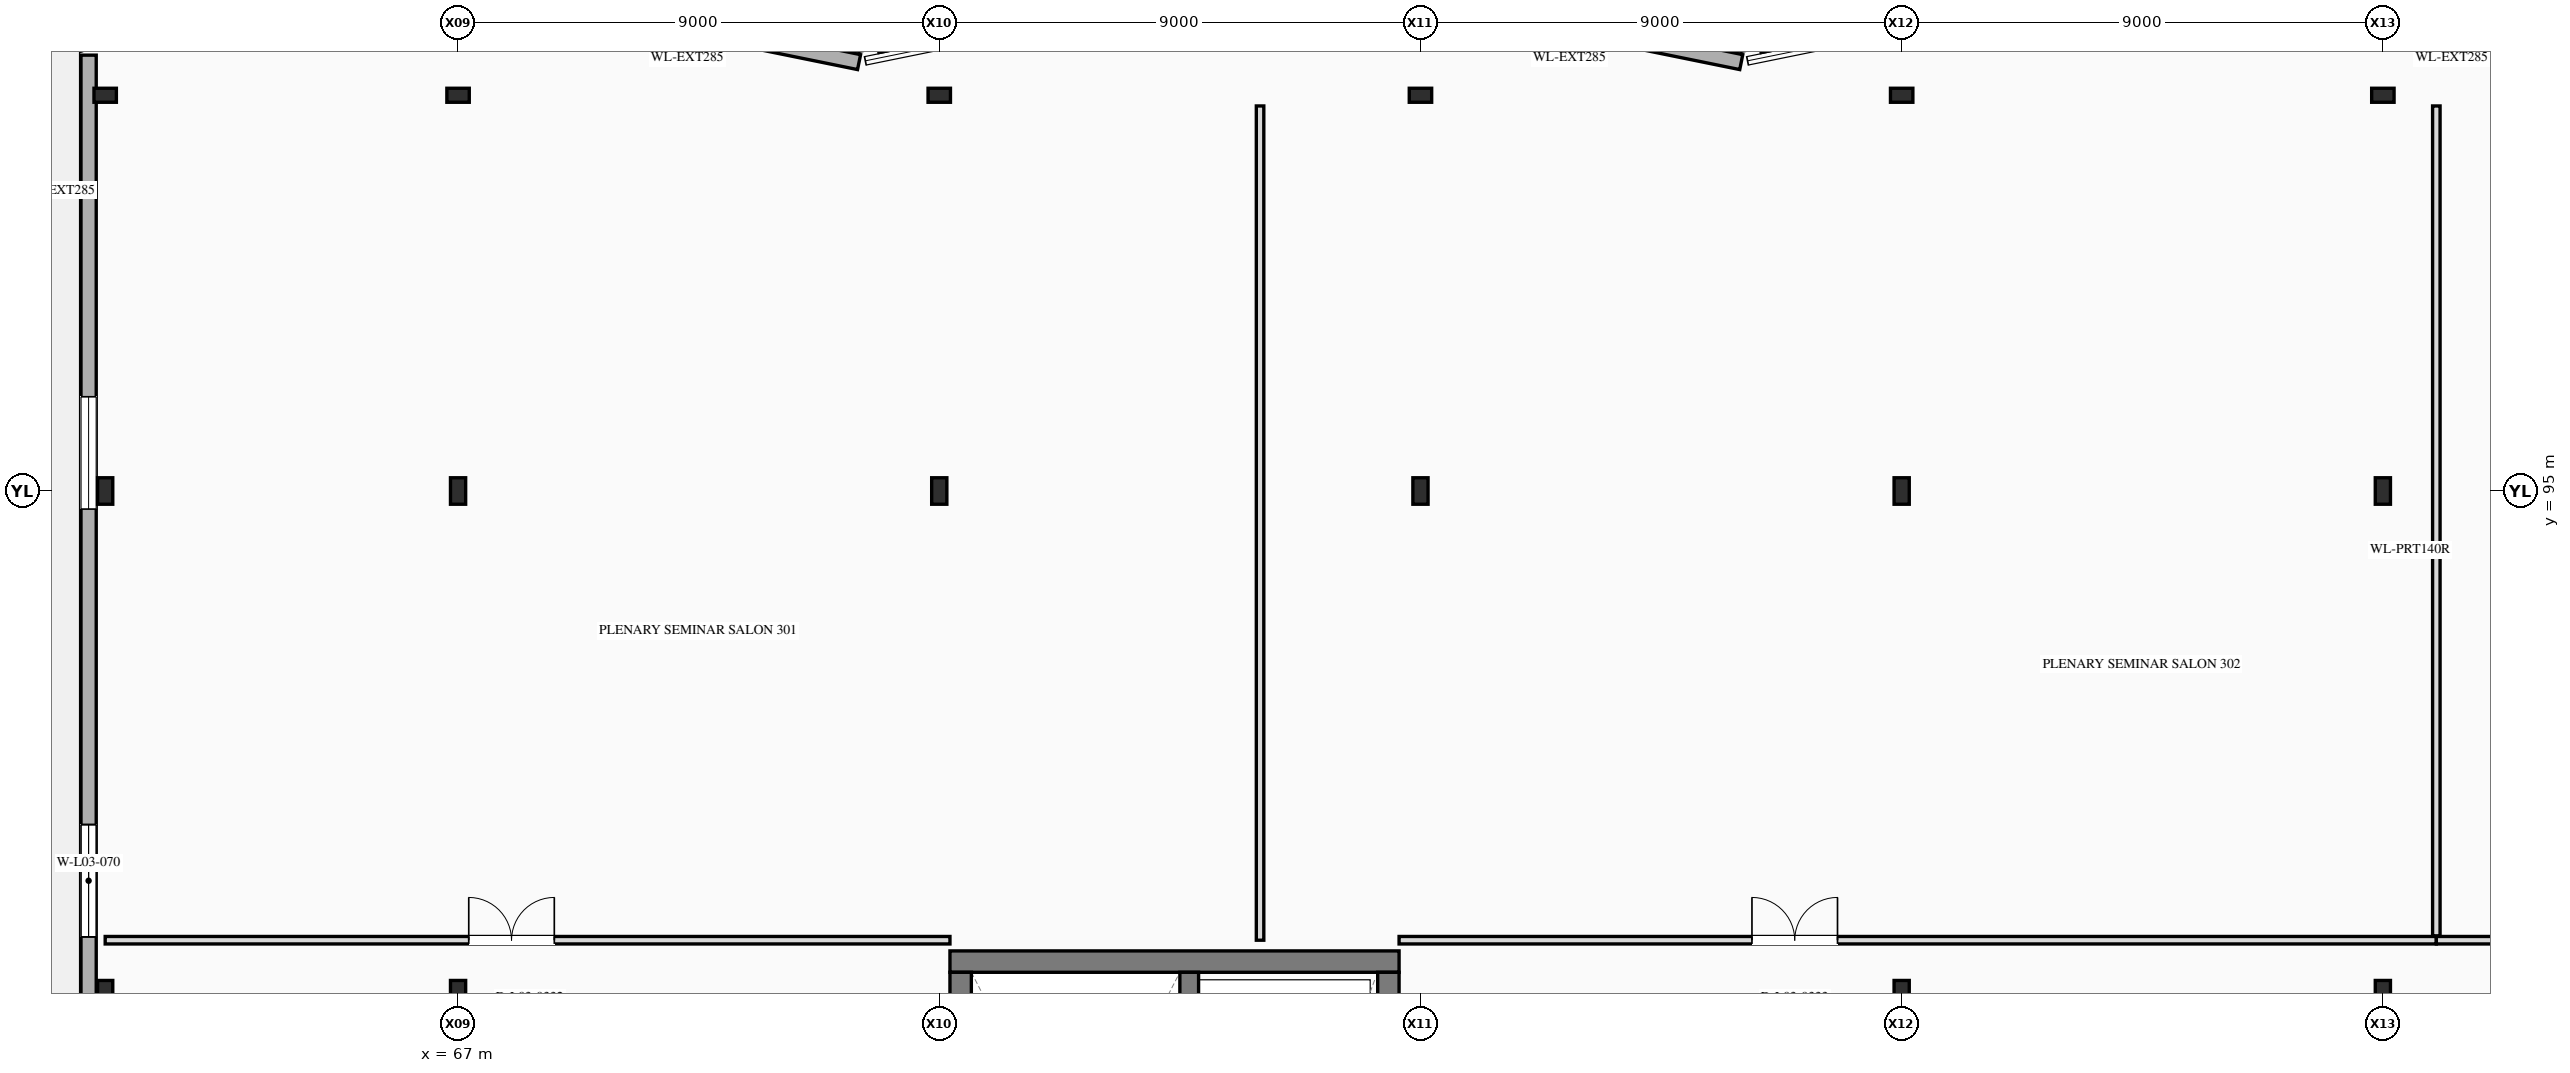
"""IFC4 building model, lengths in metres.
Left out: names, types, materials, properties, quantities, classifications, styles, units other than length and angle.
Written with IfcOpenShell. Run it as: python <this file> out.ifc"""

import sys

from ifc_helpers import new_model, si_unit, direction, frame, frame_2d, origin, origin_2d, place, context, subcontext, project, spatial, rectangle, i_section, extrude, element, fill, save


model = new_model("IFC4")
c1 = context("Model", 3, precision=1e-05, world=origin(), true_north=direction((0.0, 1.0)))
c2 = subcontext(c1, "Body", "Model", "MODEL_VIEW")
j1 = project(units=[si_unit("LENGTHUNIT", "METRE"), si_unit("PLANEANGLEUNIT", "RADIAN")], contexts=[c1])
p1 = place(None, origin())
s1 = spatial("IfcSite", under=j1, at=p1, CompositionType="ELEMENT")
p2 = place(p1, origin())
s2 = spatial("IfcBuilding", under=s1, at=p2, CompositionType="ELEMENT")
p3 = place(p2, frame((0.0, 0.0, 15.6)))
s3 = spatial("IfcBuildingStorey", under=s2, at=p3, CompositionType="ELEMENT", Elevation=15.6)
for number, where, z_axis, x_axis in (
    (1, (67.0, 85.6, 0.0), (0.0, 0.0, 1.0), (1.0, 0.0, 0.0)),
    (2, (67.0, 95.0, 0.0), (0.0, 0.0, 1.0), (1.0, 0.0, 0.0)),
    (3, (76.0, 95.0, 0.0), (0.0, 0.0, 1.0), (1.0, 0.0, 0.0)),
    (4, (85.0, 95.0, 0.0), (0.0, 0.0, 1.0), (1.0, 0.0, 0.0)),
    (5, (94.0, 85.6, 0.0), (0.0, 0.0, 1.0), (1.0, 0.0, 0.0)),
    (6, (94.0, 95.0, 0.0), (0.0, 0.0, 1.0), (1.0, 0.0, 0.0)),
    (7, (103.0, 85.6, 0.0), (0.0, 0.0, 1.0), (1.0, 0.0, 0.0)),
    (8, (103.0, 95.0, 0.0), (0.0, 0.0, 1.0), (1.0, 0.0, 0.0)),
    (9, (60.4, 85.6, 0.0), (0.0, 0.0, 1.0), (1.0, 0.0, 0.0)),
    (10, (60.4, 95.0, 0.0), (0.0, 0.0, 1.0), (1.0, 0.0, 0.0)),
):
    element("IfcColumn", number, at=place(p3, frame(where, z_axis=z_axis, x_axis=x_axis)), inside=s3, PredefinedType="COLUMN", context=c2, shape_type="SweptSolid", body=[
        extrude(i_section(OverallWidth=0.284, OverallDepth=0.495, WebThickness=0.019, FlangeThickness=0.033, at=origin_2d()), origin(), (0.0, 0.0, 1.0), 3.9),
    ])
for number, where, z_axis, x_axis in (
    (11, (60.4, 102.4, 0.0), (0.0, 0.0, 1.0), (0.0, 1.0, 0.0)),
    (12, (67.0, 102.4, 0.0), (0.0, 0.0, 1.0), (0.0, 1.0, 0.0)),
    (13, (76.0, 102.4, 0.0), (0.0, 0.0, 1.0), (0.0, 1.0, 0.0)),
    (14, (85.0, 102.4, 0.0), (0.0, 0.0, 1.0), (0.0, 1.0, 0.0)),
    (15, (94.0, 102.4, 0.0), (0.0, 0.0, 1.0), (0.0, 1.0, 0.0)),
    (16, (103.0, 102.4, 0.0), (0.0, 0.0, 1.0), (0.0, 1.0, 0.0)),
):
    element("IfcColumn", number, at=place(p3, frame(where, z_axis=z_axis, x_axis=x_axis)), inside=s3, PredefinedType="COLUMN", context=c2, shape_type="SweptSolid", body=[
        extrude(i_section(OverallWidth=0.262, OverallDepth=0.419, WebThickness=0.012, FlangeThickness=0.019, at=origin_2d()), origin(), (0.0, 0.0, 1.0), 3.9),
    ])
p4 = place(p3, frame((66.25, 104.698, 0.0), z_axis=(0.0, 0.0, 1.0), x_axis=(0.979925045119, -0.199366260807, 0.0)))
e17 = element("IfcWall", 17, at=p4, inside=s3, PredefinedType="STANDARD", context=c2, shape_type="SweptSolid", body=[
    extrude(rectangle(XDim=8.419, YDim=0.285, at=frame_2d((4.209, 0.0))), origin(), (0.0, 0.0, 1.0), 3.9),
])
p5 = place(p4, frame((0.35, 0.0, 0.9)))
e18 = element("IfcOpeningElement", 18, at=p5, cuts=e17, PredefinedType="OPENING", context=c2, shape_type="SweptSolid", body=[
    extrude(rectangle(XDim=1.5, YDim=1.7, at=frame_2d((0.75, 0.85))), frame((0.0, 0.152, 0.0), z_axis=(0.0, -1.0, 0.0), x_axis=(1.0, 0.0, 0.0)), (0.0, 0.0, 1.0), 0.305),
])
p6 = place(p3, frame((82.75, 104.698, 0.0), z_axis=(0.0, 0.0, 1.0), x_axis=(0.979925045119, -0.199366260807, 0.0)))
e19 = element("IfcWall", 19, at=p6, inside=s3, PredefinedType="STANDARD", context=c2, shape_type="SweptSolid", body=[
    extrude(rectangle(XDim=8.419, YDim=0.285, at=frame_2d((4.209, 0.0))), origin(), (0.0, 0.0, 1.0), 3.9),
])
p7 = place(p6, frame((0.35, 0.0, 0.9)))
e20 = element("IfcOpeningElement", 20, at=p7, cuts=e19, PredefinedType="OPENING", context=c2, shape_type="SweptSolid", body=[
    extrude(rectangle(XDim=1.5, YDim=1.7, at=frame_2d((0.75, 0.85))), frame((0.0, 0.152, 0.0), z_axis=(0.0, -1.0, 0.0), x_axis=(1.0, 0.0, 0.0)), (0.0, 0.0, 1.0), 0.305),
])
p8 = place(p3, frame((99.25, 104.698, 0.0), z_axis=(0.0, 0.0, 1.0), x_axis=(0.979925045119, -0.199366260807, 0.0)))
e21 = element("IfcWall", 21, at=p8, inside=s3, PredefinedType="STANDARD", context=c2, shape_type="SweptSolid", body=[
    extrude(rectangle(XDim=8.419, YDim=0.285, at=frame_2d((4.209, 0.0))), origin(), (0.0, 0.0, 1.0), 3.9),
])
p9 = place(p8, frame((0.35, 0.0, 0.9)))
e22 = element("IfcOpeningElement", 22, at=p9, cuts=e21, PredefinedType="OPENING", context=c2, shape_type="SweptSolid", body=[
    extrude(rectangle(XDim=1.5, YDim=1.7, at=frame_2d((0.75, 0.85))), frame((0.0, 0.152, 0.0), z_axis=(0.0, -1.0, 0.0), x_axis=(1.0, 0.0, 0.0)), (0.0, 0.0, 1.0), 0.305),
])
p10 = place(p3, frame((60.09, 66.662, 0.0), z_axis=(0.0, 0.0, 1.0), x_axis=(0.0, 1.0, 0.0)))
e23 = element("IfcWall", 23, at=p10, inside=s3, PredefinedType="STANDARD", context=c2, shape_type="SweptSolid", body=[
    extrude(rectangle(XDim=36.488, YDim=0.285, at=frame_2d((18.244, 0.0))), origin(), (0.0, 0.0, 1.0), 3.9),
])
p11 = place(p10, frame((4.0, 0.0, 0.9)))
e24 = element("IfcOpeningElement", 24, at=p11, cuts=e23, PredefinedType="OPENING", context=c2, shape_type="SweptSolid", body=[
    extrude(rectangle(XDim=2.1, YDim=1.9, at=frame_2d((1.05, 0.95))), frame((0.0, 0.152, 0.0), z_axis=(0.0, -1.0, 0.0), x_axis=(1.0, 0.0, 0.0)), (0.0, 0.0, 1.0), 0.305),
])
p12 = place(p10, frame((12.0, 0.0, 0.9)))
e25 = element("IfcOpeningElement", 25, at=p12, cuts=e23, PredefinedType="OPENING", context=c2, shape_type="SweptSolid", body=[
    extrude(rectangle(XDim=2.1, YDim=1.9, at=frame_2d((1.05, 0.95))), frame((0.0, 0.152, 0.0), z_axis=(0.0, -1.0, 0.0), x_axis=(1.0, 0.0, 0.0)), (0.0, 0.0, 1.0), 0.305),
])
p13 = place(p10, frame((20.0, 0.0, 0.9)))
e26 = element("IfcOpeningElement", 26, at=p13, cuts=e23, PredefinedType="OPENING", context=c2, shape_type="SweptSolid", body=[
    extrude(rectangle(XDim=2.1, YDim=1.9, at=frame_2d((1.05, 0.95))), frame((0.0, 0.152, 0.0), z_axis=(0.0, -1.0, 0.0), x_axis=(1.0, 0.0, 0.0)), (0.0, 0.0, 1.0), 0.305),
])
p14 = place(p10, frame((28.0, 0.0, 0.9)))
e27 = element("IfcOpeningElement", 27, at=p14, cuts=e23, PredefinedType="OPENING", context=c2, shape_type="SweptSolid", body=[
    extrude(rectangle(XDim=2.1, YDim=1.9, at=frame_2d((1.05, 0.95))), frame((0.0, 0.152, 0.0), z_axis=(0.0, -1.0, 0.0), x_axis=(1.0, 0.0, 0.0)), (0.0, 0.0, 1.0), 0.305),
])
p15 = place(p3, frame((84.6, 86.2, 0.0), z_axis=(0.0, 0.0, 1.0), x_axis=(-1.0, 0.0, 0.0)))
e28 = element("IfcWall", 28, at=p15, inside=s3, PredefinedType="SHEAR", context=c2, shape_type="SweptSolid", body=[
    extrude(rectangle(XDim=8.4, YDim=0.4, at=frame_2d((4.2, 0.0))), origin(), (0.0, 0.0, 1.0), 3.9),
])
p16 = place(p3, frame((76.4, 86.0, 0.0), z_axis=(0.0, 0.0, 1.0), x_axis=(0.0, -1.0, 0.0)))
e29 = element("IfcWall", 29, at=p16, inside=s3, PredefinedType="SHEAR", context=c2, shape_type="SweptSolid", body=[
    extrude(rectangle(XDim=9.4, YDim=0.4, at=frame_2d((4.7, 0.0))), origin(), (0.0, 0.0, 1.0), 3.9),
])
p17 = place(p3, frame((84.4, 76.6, 0.0), z_axis=(0.0, 0.0, 1.0), x_axis=(0.0, 1.0, 0.0)))
e30 = element("IfcWall", 30, at=p17, inside=s3, PredefinedType="SHEAR", context=c2, shape_type="SweptSolid", body=[
    extrude(rectangle(XDim=9.4, YDim=0.4, at=frame_2d((4.7, 0.0))), origin(), (0.0, 0.0, 1.0), 3.9),
])
p18 = place(p17, frame((2.05, 0.0, 0.0)))
e31 = element("IfcOpeningElement", 31, at=p18, cuts=e30, PredefinedType="OPENING", context=c2, shape_type="SweptSolid", body=[
    extrude(rectangle(XDim=1.1, YDim=2.2, at=frame_2d((0.55, 1.1))), frame((0.0, 0.21, 0.0), z_axis=(0.0, -1.0, 0.0), x_axis=(1.0, 0.0, 0.0)), (0.0, 0.0, 1.0), 0.42),
])
p19 = place(p17, frame((5.65, 0.0, 0.0)))
e32 = element("IfcOpeningElement", 32, at=p19, cuts=e30, PredefinedType="OPENING", context=c2, shape_type="SweptSolid", body=[
    extrude(rectangle(XDim=1.1, YDim=2.2, at=frame_2d((0.55, 1.1))), frame((0.0, 0.21, 0.0), z_axis=(0.0, -1.0, 0.0), x_axis=(1.0, 0.0, 0.0)), (0.0, 0.0, 1.0), 0.42),
])
p20 = place(p3, frame((80.675, 76.6, 0.0), z_axis=(0.0, 0.0, 1.0), x_axis=(0.0, 1.0, 0.0)))
e33 = element("IfcWall", 33, at=p20, inside=s3, PredefinedType="SHEAR", context=c2, shape_type="SweptSolid", body=[
    extrude(rectangle(XDim=9.4, YDim=0.35, at=frame_2d((4.7, 0.0))), origin(), (0.0, 0.0, 1.0), 3.9),
])
p21 = place(p3, frame((60.4, 86.6, 0.0), z_axis=(0.0, 0.0, 1.0), x_axis=(1.0, 0.0, 0.0)))
e34 = element("IfcWall", 34, at=p21, inside=s3, PredefinedType="PARTITIONING", context=c2, shape_type="SweptSolid", body=[
    extrude(rectangle(XDim=15.8, YDim=0.14, at=frame_2d((7.9, 0.0))), origin(), (0.0, 0.0, 1.0), 3.074),
])
p22 = place(p21, frame((6.8, 0.0, 0.0)))
e35 = element("IfcOpeningElement", 35, at=p22, cuts=e34, PredefinedType="OPENING", context=c2, shape_type="SweptSolid", body=[
    extrude(rectangle(XDim=1.6, YDim=2.4, at=frame_2d((0.8, 1.2))), frame((0.0, 0.08, 0.0), z_axis=(0.0, -1.0, 0.0), x_axis=(1.0, 0.0, 0.0)), (0.0, 0.0, 1.0), 0.16),
])
p23 = place(p3, frame((84.6, 86.6, 0.0), z_axis=(0.0, 0.0, 1.0), x_axis=(1.0, 0.0, 0.0)))
e36 = element("IfcWall", 36, at=p23, inside=s3, PredefinedType="PARTITIONING", context=c2, shape_type="SweptSolid", body=[
    extrude(rectangle(XDim=19.4, YDim=0.14, at=frame_2d((9.7, 0.0))), origin(), (0.0, 0.0, 1.0), 3.074),
])
p24 = place(p23, frame((6.6, 0.0, 0.0)))
e37 = element("IfcOpeningElement", 37, at=p24, cuts=e36, PredefinedType="OPENING", context=c2, shape_type="SweptSolid", body=[
    extrude(rectangle(XDim=1.6, YDim=2.4, at=frame_2d((0.8, 1.2))), frame((0.0, 0.08, 0.0), z_axis=(0.0, -1.0, 0.0), x_axis=(1.0, 0.0, 0.0)), (0.0, 0.0, 1.0), 0.16),
])
p25 = place(p3, frame((104.0, 86.6, 0.0), z_axis=(0.0, 0.0, 1.0), x_axis=(1.0, 0.0, 0.0)))
e38 = element("IfcWall", 38, at=p25, inside=s3, PredefinedType="PARTITIONING", context=c2, shape_type="SweptSolid", body=[
    extrude(rectangle(XDim=8.0, YDim=0.14, at=frame_2d((4.0, 0.0))), origin(), (0.0, 0.0, 1.0), 3.074),
])
p26 = place(p25, frame((5.2, 0.0, 0.0)))
e39 = element("IfcOpeningElement", 39, at=p26, cuts=e38, PredefinedType="OPENING", context=c2, shape_type="SweptSolid", body=[
    extrude(rectangle(XDim=1.6, YDim=2.4, at=frame_2d((0.8, 1.2))), frame((0.0, 0.08, 0.0), z_axis=(0.0, -1.0, 0.0), x_axis=(1.0, 0.0, 0.0)), (0.0, 0.0, 1.0), 0.16),
])
p27 = place(p3, frame((82.0, 86.6, 0.0), z_axis=(0.0, 0.0, 1.0), x_axis=(0.0, 1.0, 0.0)))
e40 = element("IfcWall", 40, at=p27, inside=s3, PredefinedType="PARTITIONING", context=c2, shape_type="SweptSolid", body=[
    extrude(rectangle(XDim=15.6, YDim=0.14, at=frame_2d((7.8, 0.0))), origin(), (0.0, 0.0, 1.0), 3.013),
])
p28 = place(p3, frame((104.0, 86.682, 0.0), z_axis=(0.0, 0.0, 1.0), x_axis=(0.0, 1.0, 0.0)))
e41 = element("IfcWall", 41, at=p28, inside=s3, PredefinedType="PARTITIONING", context=c2, shape_type="SweptSolid", body=[
    extrude(rectangle(XDim=15.518, YDim=0.14, at=frame_2d((7.759, 0.0))), origin(), (0.0, 0.0, 1.0), 3.013),
])
p29 = place(p13, origin())
e42 = element("IfcWindow", 42, at=p29, inside=s3, PartitioningType="SINGLE_PANEL", PredefinedType="WINDOW", context=c2, shape_type="SweptSolid", body=[
    extrude(rectangle(XDim=2.1, YDim=1.9, at=frame_2d((1.05, 0.95))), frame((0.0, 0.03, 0.0), z_axis=(0.0, -1.0, 0.0), x_axis=(1.0, 0.0, 0.0)), (0.0, 0.0, 1.0), 0.06),
])
fill(e26, e42)
p30 = place(p14, origin())
e43 = element("IfcWindow", 43, at=p30, inside=s3, PartitioningType="SINGLE_PANEL", PredefinedType="WINDOW", context=c2, shape_type="SweptSolid", body=[
    extrude(rectangle(XDim=2.1, YDim=1.9, at=frame_2d((1.05, 0.95))), frame((0.0, 0.03, 0.0), z_axis=(0.0, -1.0, 0.0), x_axis=(1.0, 0.0, 0.0)), (0.0, 0.0, 1.0), 0.06),
])
fill(e27, e43)
p31 = place(p22, origin())
e44 = element("IfcDoor", 44, at=p31, inside=s3, OperationType="DOUBLE_DOOR_SINGLE_SWING", PredefinedType="DOOR", context=c2, shape_type="SweptSolid", body=[
    extrude(rectangle(XDim=1.6, YDim=2.4, at=frame_2d((0.8, 1.2))), frame((0.0, 0.025, 0.0), z_axis=(0.0, -1.0, 0.0), x_axis=(1.0, 0.0, 0.0)), (0.0, 0.0, 1.0), 0.05),
])
fill(e35, e44)
p32 = place(p24, origin())
e45 = element("IfcDoor", 45, at=p32, inside=s3, OperationType="DOUBLE_DOOR_SINGLE_SWING", PredefinedType="DOOR", context=c2, shape_type="SweptSolid", body=[
    extrude(rectangle(XDim=1.6, YDim=2.4, at=frame_2d((0.8, 1.2))), frame((0.0, 0.025, 0.0), z_axis=(0.0, -1.0, 0.0), x_axis=(1.0, 0.0, 0.0)), (0.0, 0.0, 1.0), 0.05),
])
fill(e37, e45)
save(model, sys.argv[1])
